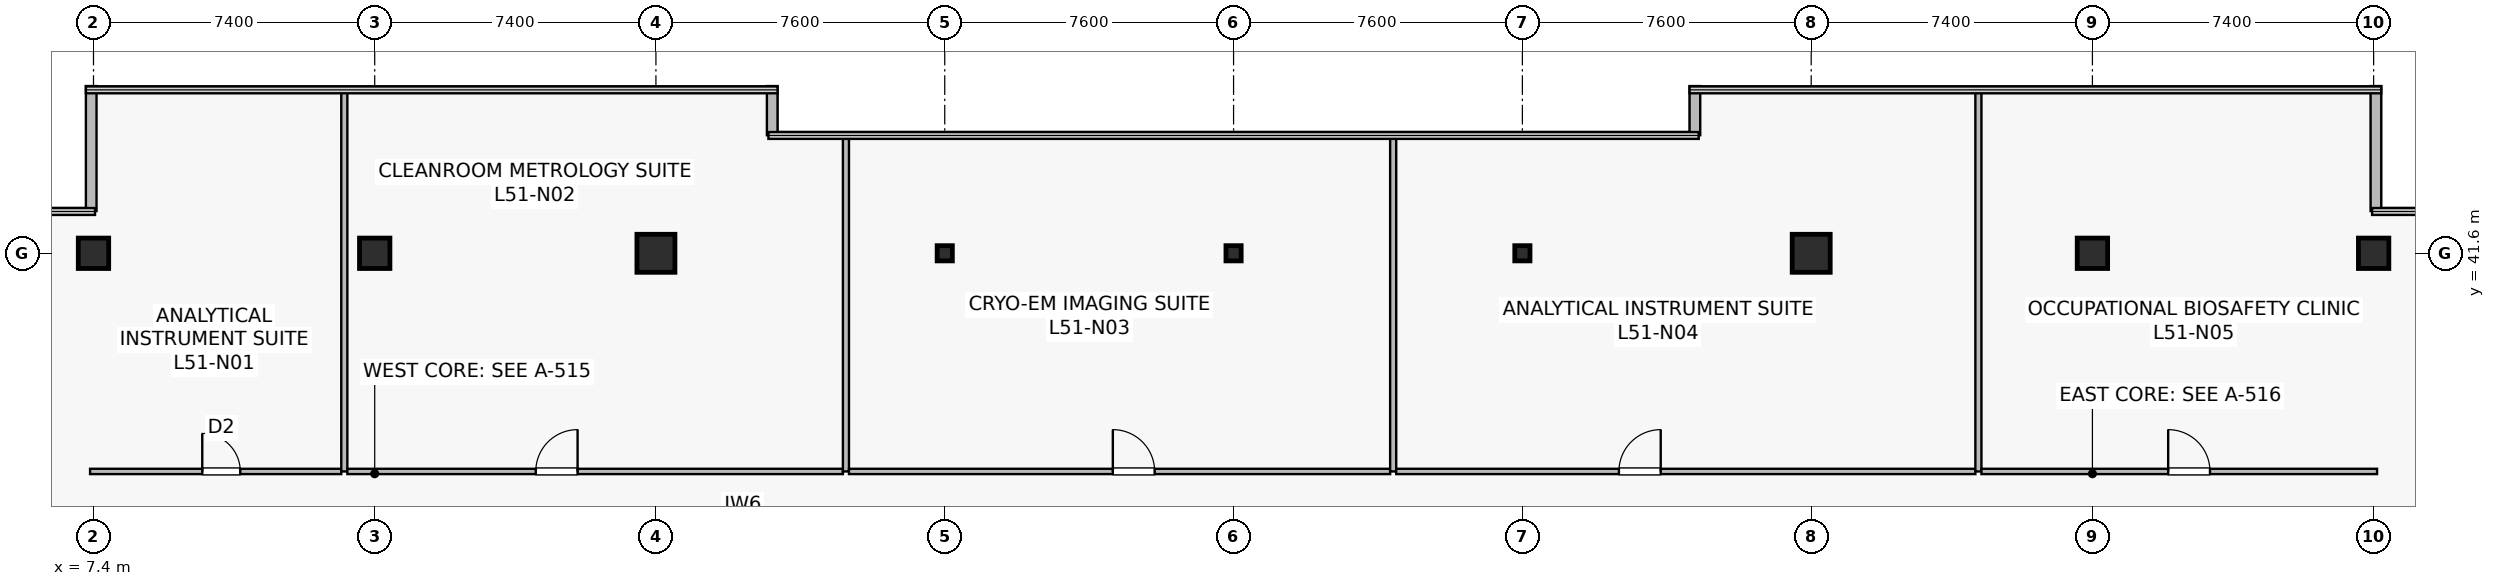
"""IFC4 building model, lengths in metres.
Left out: names, types, materials, properties, quantities, classifications, styles, units other than length and angle.
Written with IfcOpenShell. Run it as: python <this file> out.ifc"""

import sys

from ifc_helpers import new_model, si_unit, direction, frame, frame_2d, origin, origin_2d, place, context, subcontext, project, spatial, rectangle, hollow_rectangle, extrude, source, transform, mapped, element, fill, save


model = new_model("IFC4")
c1 = context("Model", 3, precision=1e-05, world=origin(), true_north=direction((0.0, 1.0)))
c2 = subcontext(c1, "Body", "Model", "MODEL_VIEW")
j1 = project(units=[si_unit("LENGTHUNIT", "METRE"), si_unit("PLANEANGLEUNIT", "RADIAN")], contexts=[c1])
p1 = place(None, origin())
s1 = spatial("IfcSite", under=j1, at=p1, CompositionType="ELEMENT")
p2 = place(p1, origin())
s2 = spatial("IfcBuilding", under=s1, at=p2, CompositionType="ELEMENT")
p3 = place(p2, frame((0.0, 0.0, 213.7)))
s3 = spatial("IfcBuildingStorey", under=s2, at=p3, CompositionType="ELEMENT", Elevation=213.7)
m1 = source(origin(), c2, "Body", "SweptSolid", [
    extrude(rectangle(XDim=0.8, YDim=0.8, at=origin_2d()), origin(), (0.0, 0.0, 1.0), 4.1),
])
p4 = place(p3, frame((14.8, 41.6, 0.0), z_axis=(0.0, 0.0, 1.0), x_axis=(1.0, 0.0, 0.0)))
e1 = element("IfcColumn", 1, at=p4, inside=s3, PredefinedType="COLUMN", context=c2, shape_type="MappedRepresentation", body=[
    mapped(m1, transform((0.0, 0.0, 0.0), scale=1.0)),
])
m2 = source(origin(), c2, "Body", "SweptSolid", [
    extrude(rectangle(XDim=1.0, YDim=1.0, at=origin_2d()), origin(), (0.0, 0.0, 1.0), 4.1),
])
for number, where, z_axis, x_axis in (
    (2, (22.2, 41.6, 0.0), (0.0, 0.0, 1.0), (1.0, 0.0, 0.0)),
    (3, (52.6, 41.6, 0.0), (0.0, 0.0, 1.0), (1.0, 0.0, 0.0)),
):
    element("IfcColumn", number, at=place(p3, frame(where, z_axis=z_axis, x_axis=x_axis)), inside=s3, PredefinedType="COLUMN", context=c2, shape_type="MappedRepresentation", body=[
        mapped(m2, transform((0.0, 0.0, 0.0), scale=1.0)),
    ])
for number, where, z_axis, x_axis in (
    (4, (60.0, 41.6, 0.0), (0.0, 0.0, 1.0), (1.0, 0.0, 0.0)),
    (5, (7.4, 41.6, 0.0), (0.0, 0.0, 1.0), (1.0, 0.0, 0.0)),
    (6, (67.4, 41.6, 0.0), (0.0, 0.0, 1.0), (1.0, 0.0, 0.0)),
):
    element("IfcColumn", number, at=place(p3, frame(where, z_axis=z_axis, x_axis=x_axis)), inside=s3, PredefinedType="COLUMN", context=c2, shape_type="MappedRepresentation", body=[
        mapped(m1, transform((0.0, 0.0, 0.0), scale=1.0)),
    ])
m3 = source(origin(), c2, "Body", "SweptSolid", [
    extrude(hollow_rectangle(XDim=0.4, YDim=0.4, WallThickness=0.019, at=origin_2d()), origin(), (0.0, 0.0, 1.0), 4.1),
])
for number, where, z_axis, x_axis in (
    (7, (29.8, 41.6, 0.0), (0.0, 0.0, 1.0), (1.0, 0.0, 0.0)),
    (8, (37.4, 41.6, 0.0), (0.0, 0.0, 1.0), (1.0, 0.0, 0.0)),
    (9, (45.0, 41.6, 0.0), (0.0, 0.0, 1.0), (1.0, 0.0, 0.0)),
):
    element("IfcColumn", number, at=place(p3, frame(where, z_axis=z_axis, x_axis=x_axis)), inside=s3, PredefinedType="COLUMN", context=c2, shape_type="MappedRepresentation", body=[
        mapped(m3, transform((0.0, 0.0, 0.0), scale=1.0)),
    ])
p5 = place(p3, frame((67.46, 42.712, 0.0), z_axis=(0.0, 0.0, 1.0), x_axis=(0.0, 1.0, 0.0)))
e10 = element("IfcWall", 10, at=p5, inside=s3, PredefinedType="STANDARD", context=c2, shape_type="SweptSolid", body=[
    extrude(rectangle(XDim=3.288, YDim=0.28, at=frame_2d((1.644, 0.0))), origin(), (0.0, 0.0, 1.0), 3.8),
])
for number, where, z_axis, x_axis in (
    (11, (49.54, 46.0, 0.0), (0.0, 0.0, 1.0), (0.0, -1.0, 0.0)),
    (12, (25.26, 44.707, 0.0), (0.0, 0.0, 1.0), (0.0, 1.0, 0.0)),
):
    element("IfcWall", number, at=place(p3, frame(where, z_axis=z_axis, x_axis=x_axis)), inside=s3, PredefinedType="STANDARD", context=c2, shape_type="SweptSolid", body=[
        extrude(rectangle(XDim=1.293, YDim=0.28, at=frame_2d((0.646, 0.0))), origin(), (0.0, 0.0, 1.0), 3.8),
    ])
p6 = place(p3, frame((7.34, 46.0, 0.0), z_axis=(0.0, 0.0, 1.0), x_axis=(0.0, -1.0, 0.0)))
e13 = element("IfcWall", 13, at=p6, inside=s3, PredefinedType="STANDARD", context=c2, shape_type="SweptSolid", body=[
    extrude(rectangle(XDim=3.288, YDim=0.28, at=frame_2d((1.644, 0.0))), origin(), (0.0, 0.0, 1.0), 3.8),
])
p7 = place(p3, frame((7.31, 35.86, 0.0), z_axis=(0.0, 0.0, 1.0), x_axis=(1.0, 0.0, 0.0)))
e14 = element("IfcWall", 14, at=p7, inside=s3, PredefinedType="PARTITIONING", context=c2, shape_type="SweptSolid", body=[
    extrude(rectangle(XDim=6.61, YDim=0.14, at=frame_2d((3.305, 0.0))), origin(), (0.0, 0.0, 1.0), 3.335),
])
p8 = place(p7, frame((2.952, 0.0, 0.0)))
e15 = element("IfcOpeningElement", 15, at=p8, cuts=e14, PredefinedType="OPENING", context=c2, shape_type="SweptSolid", body=[
    extrude(rectangle(XDim=1.0, YDim=2.15, at=frame_2d((0.5, 1.075))), frame((0.0, 0.08, 0.0), z_axis=(0.0, -1.0, 0.0), x_axis=(1.0, 0.0, 0.0)), (0.0, 0.0, 1.0), 0.16),
])
p9 = place(p3, frame((14.0, 35.86, 0.0), z_axis=(0.0, 0.0, 1.0), x_axis=(0.0, 1.0, 0.0)))
e16 = element("IfcWall", 16, at=p9, inside=s3, PredefinedType="PARTITIONING", context=c2, shape_type="SweptSolid", body=[
    extrude(rectangle(XDim=10.03, YDim=0.16, at=frame_2d((5.015, 0.0))), origin(), (0.0, 0.0, 1.0), 3.135),
])
p10 = place(p3, frame((14.08, 35.86, 0.0), z_axis=(0.0, 0.0, 1.0), x_axis=(1.0, 0.0, 0.0)))
e17 = element("IfcWall", 17, at=p10, inside=s3, PredefinedType="PARTITIONING", context=c2, shape_type="SweptSolid", body=[
    extrude(rectangle(XDim=13.04, YDim=0.14, at=frame_2d((6.52, 0.0))), origin(), (0.0, 0.0, 1.0), 3.197),
])
p11 = place(p10, frame((4.958, 0.0, 0.0)))
e18 = element("IfcOpeningElement", 18, at=p11, cuts=e17, PredefinedType="OPENING", context=c2, shape_type="SweptSolid", body=[
    extrude(rectangle(XDim=1.1, YDim=2.18, at=frame_2d((0.55, 1.09))), frame((0.0, 0.08, 0.0), z_axis=(0.0, -1.0, 0.0), x_axis=(1.0, 0.0, 0.0)), (0.0, 0.0, 1.0), 0.16),
])
p12 = place(p3, frame((27.2, 35.86, 0.0), z_axis=(0.0, 0.0, 1.0), x_axis=(0.0, 1.0, 0.0)))
e19 = element("IfcWall", 19, at=p12, inside=s3, PredefinedType="PARTITIONING", context=c2, shape_type="SweptSolid", body=[
    extrude(rectangle(XDim=8.83, YDim=0.16, at=frame_2d((4.415, 0.0))), origin(), (0.0, 0.0, 1.0), 3.135),
])
p13 = place(p3, frame((27.28, 35.86, 0.0), z_axis=(0.0, 0.0, 1.0), x_axis=(1.0, 0.0, 0.0)))
e20 = element("IfcWall", 20, at=p13, inside=s3, PredefinedType="PARTITIONING", context=c2, shape_type="SweptSolid", body=[
    extrude(rectangle(XDim=14.24, YDim=0.14, at=frame_2d((7.12, 0.0))), origin(), (0.0, 0.0, 1.0), 3.197),
])
p14 = place(p13, frame((6.943, 0.0, 0.0)))
e21 = element("IfcOpeningElement", 21, at=p14, cuts=e20, PredefinedType="OPENING", context=c2, shape_type="SweptSolid", body=[
    extrude(rectangle(XDim=1.1, YDim=2.18, at=frame_2d((0.55, 1.09))), frame((0.0, 0.08, 0.0), z_axis=(0.0, -1.0, 0.0), x_axis=(1.0, 0.0, 0.0)), (0.0, 0.0, 1.0), 0.16),
])
p15 = place(p3, frame((41.6, 35.86, 0.0), z_axis=(0.0, 0.0, 1.0), x_axis=(0.0, 1.0, 0.0)))
e22 = element("IfcWall", 22, at=p15, inside=s3, PredefinedType="PARTITIONING", context=c2, shape_type="SweptSolid", body=[
    extrude(rectangle(XDim=8.83, YDim=0.16, at=frame_2d((4.415, 0.0))), origin(), (0.0, 0.0, 1.0), 3.135),
])
p16 = place(p3, frame((41.68, 35.86, 0.0), z_axis=(0.0, 0.0, 1.0), x_axis=(1.0, 0.0, 0.0)))
e23 = element("IfcWall", 23, at=p16, inside=s3, PredefinedType="PARTITIONING", context=c2, shape_type="SweptSolid", body=[
    extrude(rectangle(XDim=15.24, YDim=0.14, at=frame_2d((7.62, 0.0))), origin(), (0.0, 0.0, 1.0), 3.197),
])
p17 = place(p16, frame((5.86, 0.0, 0.0)))
e24 = element("IfcOpeningElement", 24, at=p17, cuts=e23, PredefinedType="OPENING", context=c2, shape_type="SweptSolid", body=[
    extrude(rectangle(XDim=1.1, YDim=2.18, at=frame_2d((0.55, 1.09))), frame((0.0, 0.08, 0.0), z_axis=(0.0, -1.0, 0.0), x_axis=(1.0, 0.0, 0.0)), (0.0, 0.0, 1.0), 0.16),
])
p18 = place(p3, frame((57.0, 35.86, 0.0), z_axis=(0.0, 0.0, 1.0), x_axis=(0.0, 1.0, 0.0)))
e25 = element("IfcWall", 25, at=p18, inside=s3, PredefinedType="PARTITIONING", context=c2, shape_type="SweptSolid", body=[
    extrude(rectangle(XDim=10.03, YDim=0.16, at=frame_2d((5.015, 0.0))), origin(), (0.0, 0.0, 1.0), 3.135),
])
p19 = place(p3, frame((57.08, 35.86, 0.0), z_axis=(0.0, 0.0, 1.0), x_axis=(1.0, 0.0, 0.0)))
e26 = element("IfcWall", 26, at=p19, inside=s3, PredefinedType="PARTITIONING", context=c2, shape_type="SweptSolid", body=[
    extrude(rectangle(XDim=10.41, YDim=0.14, at=frame_2d((5.205, 0.0))), origin(), (0.0, 0.0, 1.0), 3.197),
])
p20 = place(p19, frame((4.913, 0.0, 0.0)))
e27 = element("IfcOpeningElement", 27, at=p20, cuts=e26, PredefinedType="OPENING", context=c2, shape_type="SweptSolid", body=[
    extrude(rectangle(XDim=1.1, YDim=2.18, at=frame_2d((0.55, 1.09))), frame((0.0, 0.08, 0.0), z_axis=(0.0, -1.0, 0.0), x_axis=(1.0, 0.0, 0.0)), (0.0, 0.0, 1.0), 0.16),
])
m4 = source(origin(), c2, "Body", "SweptSolid", [
    extrude(rectangle(XDim=1.0, YDim=2.15, at=frame_2d((0.5, 1.075))), frame((0.0, 0.025, 0.0), z_axis=(0.0, -1.0, 0.0), x_axis=(1.0, 0.0, 0.0)), (0.0, 0.0, 1.0), 0.05),
])
p21 = place(p8, origin())
e28 = element("IfcDoor", 28, at=p21, inside=s3, OperationType="SINGLE_SWING_LEFT", PredefinedType="DOOR", context=c2, shape_type="MappedRepresentation", body=[
    mapped(m4, transform((0.0, 0.0, 0.0), scale=1.0)),
])
fill(e15, e28)
m5 = source(origin(), c2, "Body", "SweptSolid", [
    extrude(rectangle(XDim=1.1, YDim=2.18, at=frame_2d((0.55, 1.09))), frame((0.0, 0.025, 0.0), z_axis=(0.0, -1.0, 0.0), x_axis=(1.0, 0.0, 0.0)), (0.0, 0.0, 1.0), 0.05),
])
p22 = place(p11, origin())
e29 = element("IfcDoor", 29, at=p22, inside=s3, OperationType="SINGLE_SWING_RIGHT", PredefinedType="DOOR", context=c2, shape_type="MappedRepresentation", body=[
    mapped(m5, transform((0.0, 0.0, 0.0), scale=1.0)),
])
fill(e18, e29)
p23 = place(p14, origin())
e30 = element("IfcDoor", 30, at=p23, inside=s3, OperationType="SINGLE_SWING_LEFT", PredefinedType="DOOR", context=c2, shape_type="MappedRepresentation", body=[
    mapped(m5, transform((0.0, 0.0, 0.0), scale=1.0)),
])
fill(e21, e30)
p24 = place(p17, origin())
e31 = element("IfcDoor", 31, at=p24, inside=s3, OperationType="SINGLE_SWING_RIGHT", PredefinedType="DOOR", context=c2, shape_type="MappedRepresentation", body=[
    mapped(m5, transform((0.0, 0.0, 0.0), scale=1.0)),
])
fill(e24, e31)
p25 = place(p20, origin())
e32 = element("IfcDoor", 32, at=p25, inside=s3, OperationType="SINGLE_SWING_LEFT", PredefinedType="DOOR", context=c2, shape_type="MappedRepresentation", body=[
    mapped(m5, transform((0.0, 0.0, 0.0), scale=1.0)),
])
fill(e27, e32)
save(model, sys.argv[1])
